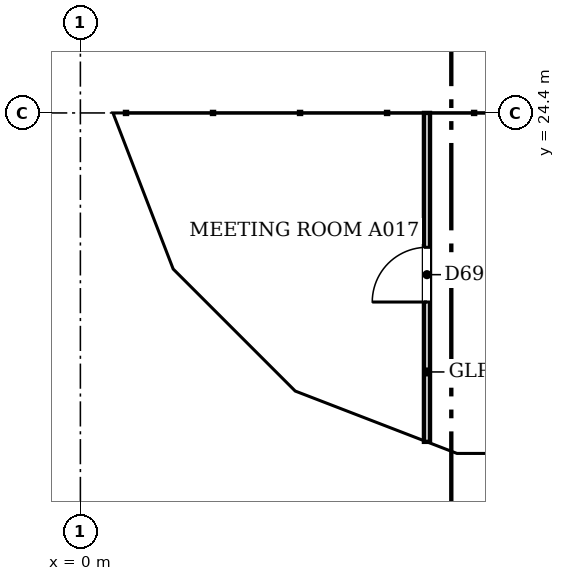
"""IFC4 building model, lengths in metres.
Left out: names, types, materials, properties, quantities, classifications, styles, units other than length and angle.
Written with IfcOpenShell. Run it as: python <this file> out.ifc"""

import sys

from ifc_helpers import new_model, si_unit, direction, frame, frame_2d, origin, place, context, subcontext, project, spatial, polyline, rectangle, outline, extrude, faceted_brep, source, transform, mapped, element, fill, save


model = new_model("IFC4")
c1 = context("Model", 3, precision=1e-05, world=origin(), true_north=direction((0.0, 1.0)))
c2 = subcontext(c1, "Body", "Model", "MODEL_VIEW")
j1 = project(units=[si_unit("LENGTHUNIT", "METRE"), si_unit("PLANEANGLEUNIT", "RADIAN")], contexts=[c1])
p1 = place(None, origin())
s1 = spatial("IfcSite", under=j1, at=p1, CompositionType="ELEMENT")
p2 = place(p1, origin())
s2 = spatial("IfcBuilding", under=s1, at=p2, CompositionType="ELEMENT")
p3 = place(p2, frame((0.0, 0.0, 139.2)))
s3 = spatial("IfcBuildingStorey", under=s2, at=p3, CompositionType="ELEMENT", Elevation=139.2)
m1 = source(origin(), c2, "Body", "Brep", [
    faceted_brep([(3.003, -0.25, 0.0), (3.05, -0.25, 0.06), (3.05, -0.25, 7.54), (3.003, -0.25, 7.6), (0.0, -0.25, 3.8), (0.0, 0.25, 3.8), (2.957, 0.25, 7.541), (2.957, 0.25, 0.059), (3.003, 0.0, 0.0), (3.003, 0.0, 7.6)], [[[0, 1, 2, 3, 4]], [[5, 6, 7]], [[1, 0, 8]], [[9, 3, 2]], [[6, 5, 4, 3, 9]], [[5, 7, 8, 0, 4]], [[1, 8, 7, 6, 9, 2]]]),
])
p4 = place(p3, frame((0.25, 27.45, -3.8), z_axis=(0.0, 0.0, 1.0), x_axis=(0.0, -1.0, 0.0)))
e1 = element("IfcWall", 1, at=p4, inside=s3, PredefinedType="SOLIDWALL", context=c2, shape_type="MappedRepresentation", body=[
    mapped(m1, transform((0.0, 0.0, 0.0), scale=1.0)),
])
m2 = source(origin(), c2, "Body", "SweptSolid", [
    extrude(outline(polyline([(2.803, 6.944), (0.319, 3.8), (2.803, 0.656), (2.803, 6.944)])), frame((0.0, 0.26, 0.0), z_axis=(0.0, -1.0, 0.0), x_axis=(1.0, 0.0, 0.0)), (0.0, 0.0, 1.0), 0.52),
])
p5 = place(p4, origin())
e2 = element("IfcOpeningElement", 2, at=p5, cuts=e1, PredefinedType="OPENING", context=c2, shape_type="MappedRepresentation", body=[
    mapped(m2, transform((0.0, 0.0, 0.0), scale=1.0)),
])
m3 = source(origin(), c2, "Body", "Brep", [
    faceted_brep([(0.047, -0.25, 0.0), (2.997, -0.25, 3.8), (0.047, -0.25, 7.6), (0.0, -0.25, 7.541), (0.0, -0.25, 0.059), (0.093, 0.25, 7.54), (2.944, 0.25, 3.868), (2.944, 0.25, 3.732), (0.093, 0.25, 0.06), (2.997, 0.0, 3.8), (0.047, 0.0, 0.0), (0.047, 0.0, 7.6)], [[[0, 1, 2, 3, 4]], [[5, 6, 7, 8]], [[8, 7, 9, 1, 0, 10]], [[6, 5, 11, 2, 1, 9]], [[3, 2, 11]], [[10, 0, 4]], [[8, 10, 4, 3, 11, 5]], [[9, 7, 6]]]),
])
p6 = place(p3, frame((0.233, 24.49, -3.8), z_axis=(0.0, 0.0, 1.0), x_axis=(0.359901446078, -0.932990326376, 0.0)))
e3 = element("IfcWall", 3, at=p6, inside=s3, PredefinedType="SOLIDWALL", context=c2, shape_type="MappedRepresentation", body=[
    mapped(m3, transform((0.0, 0.0, 0.0), scale=1.0)),
])
m4 = source(origin(), c2, "Body", "SweptSolid", [
    extrude(outline(polyline([(0.247, 0.665), (2.681, 3.8), (0.247, 6.935), (0.247, 0.665)])), frame((0.0, 0.26, 0.0), z_axis=(0.0, -1.0, 0.0), x_axis=(1.0, 0.0, 0.0)), (0.0, 0.0, 1.0), 0.52),
])
p7 = place(p6, origin())
e4 = element("IfcOpeningElement", 4, at=p7, cuts=e3, PredefinedType="OPENING", context=c2, shape_type="MappedRepresentation", body=[
    mapped(m4, transform((0.0, 0.0, 0.0), scale=1.0)),
])
m5 = source(origin(), c2, "Body", "Brep", [
    faceted_brep([(2.944, -0.25, 0.0), (2.997, -0.25, 0.068), (2.997, -0.25, 7.532), (2.944, -0.25, 7.6), (0.0, -0.25, 3.8), (0.053, 0.25, 3.868), (2.891, 0.25, 7.532), (2.891, 0.25, 0.068), (0.053, 0.25, 3.732), (2.944, 0.0, 0.0), (2.944, 0.0, 7.6), (0.0, 0.0, 3.8)], [[[0, 1, 2, 3, 4]], [[5, 6, 7, 8]], [[1, 0, 9]], [[10, 3, 2]], [[6, 5, 11, 4, 3, 10]], [[8, 7, 9, 0, 4, 11]], [[8, 11, 5]], [[1, 9, 7, 6, 10, 2]]]),
])
p8 = place(p3, frame((1.312, 21.694, -3.8), z_axis=(0.0, 0.0, 1.0), x_axis=(0.707066050402, -0.707147509625, 0.0)))
e5 = element("IfcWall", 5, at=p8, inside=s3, PredefinedType="SOLIDWALL", context=c2, shape_type="MappedRepresentation", body=[
    mapped(m5, transform((0.0, 0.0, 0.0), scale=1.0)),
])
m6 = source(origin(), c2, "Body", "SweptSolid", [
    extrude(outline(polyline([(2.744, 6.934), (0.316, 3.8), (2.744, 0.667), (2.744, 6.934)])), frame((0.0, 0.26, 0.0), z_axis=(0.0, -1.0, 0.0), x_axis=(1.0, 0.0, 0.0)), (0.0, 0.0, 1.0), 0.52),
])
p9 = place(p8, origin())
e6 = element("IfcOpeningElement", 6, at=p9, cuts=e5, PredefinedType="OPENING", context=c2, shape_type="MappedRepresentation", body=[
    mapped(m6, transform((0.0, 0.0, 0.0), scale=1.0)),
])
m7 = source(origin(), c2, "Body", "Brep", [
    faceted_brep([(0.053, -0.25, 0.0), (3.003, -0.25, 3.8), (0.053, -0.25, 7.6), (0.0, -0.25, 7.532), (0.0, -0.25, 0.068), (0.106, 0.25, 7.532), (2.957, 0.25, 3.86), (2.957, 0.25, 3.74), (0.106, 0.25, 0.068), (3.003, 0.0, 3.8), (0.053, 0.0, 0.0), (0.053, 0.0, 7.6)], [[[0, 1, 2, 3, 4]], [[5, 6, 7, 8]], [[8, 7, 9, 1, 0, 10]], [[6, 5, 11, 2, 1, 9]], [[3, 2, 11]], [[10, 0, 4]], [[8, 10, 4, 3, 11, 5]], [[9, 7, 6]]]),
])
p10 = place(p3, frame((3.344, 19.631, -3.8), z_axis=(0.0, 0.0, 1.0), x_axis=(0.933007896601, -0.359855894603, 0.0)))
e7 = element("IfcWall", 7, at=p10, inside=s3, PredefinedType="SOLIDWALL", context=c2, shape_type="MappedRepresentation", body=[
    mapped(m7, transform((0.0, 0.0, 0.0), scale=1.0)),
])
m8 = source(origin(), c2, "Body", "SweptSolid", [
    extrude(outline(polyline([(0.253, 0.665), (2.687, 3.8), (0.253, 6.935), (0.253, 0.665)])), frame((0.0, 0.26, 0.0), z_axis=(0.0, -1.0, 0.0), x_axis=(1.0, 0.0, 0.0)), (0.0, 0.0, 1.0), 0.52),
])
p11 = place(p10, origin())
e8 = element("IfcOpeningElement", 8, at=p11, cuts=e7, PredefinedType="OPENING", context=c2, shape_type="MappedRepresentation", body=[
    mapped(m8, transform((0.0, 0.0, 0.0), scale=1.0)),
])
m9 = source(origin(), c2, "Body", "Brep", [
    faceted_brep([(3.003, -0.25, 0.0), (6.053, -0.25, 3.8), (3.003, -0.25, 7.6), (0.0, -0.25, 3.8), (0.047, 0.25, 3.859), (3.003, 0.25, 7.6), (6.053, 0.25, 3.8), (3.003, 0.25, 0.0), (0.047, 0.25, 3.741), (0.0, 0.0, 3.8)], [[[0, 1, 2, 3]], [[4, 5, 6, 7, 8]], [[7, 6, 1, 0]], [[6, 5, 2, 1]], [[5, 4, 9, 3, 2]], [[8, 7, 0, 3, 9]], [[8, 9, 4]]]),
])
p12 = place(p3, frame((6.146, 18.55, -3.8), z_axis=(0.0, 0.0, 1.0), x_axis=(1.0, 0.0, 0.0)))
e9 = element("IfcWall", 9, at=p12, inside=s3, PredefinedType="SOLIDWALL", context=c2, shape_type="MappedRepresentation", body=[
    mapped(m9, transform((0.0, 0.0, 0.0), scale=1.0)),
])
m10 = source(origin(), c2, "Body", "SweptSolid", [
    extrude(outline(polyline([(3.005, 0.401), (5.733, 3.8), (3.005, 7.199), (0.319, 3.8), (3.005, 0.401)])), frame((0.0, 0.26, 0.0), z_axis=(0.0, -1.0, 0.0), x_axis=(1.0, 0.0, 0.0)), (0.0, 0.0, 1.0), 0.52),
])
p13 = place(p12, origin())
e10 = element("IfcOpeningElement", 10, at=p13, cuts=e9, PredefinedType="OPENING", context=c2, shape_type="MappedRepresentation", body=[
    mapped(m10, transform((0.0, 0.0, 0.0), scale=1.0)),
])
p14 = place(p2, frame((0.0, 0.0, 143.0)))
s4 = spatial("IfcBuildingStorey", under=s2, at=p14, CompositionType="ELEMENT", Elevation=143.0)
m11 = source(origin(), c2, "Body", "Brep", [
    faceted_brep([(3.05, -0.25, 0.0), (6.053, -0.25, 3.8), (3.05, -0.25, 7.6), (0.0, -0.25, 3.8), (0.0, 0.25, 3.8), (3.05, 0.25, 7.6), (6.007, 0.25, 3.859), (6.007, 0.25, 3.741), (3.05, 0.25, 0.0), (6.053, 0.0, 3.8)], [[[0, 1, 2, 3]], [[4, 5, 6, 7, 8]], [[8, 7, 9, 1, 0]], [[6, 5, 2, 1, 9]], [[5, 4, 3, 2]], [[4, 8, 0, 3]], [[9, 7, 6]]]),
])
p15 = place(p14, frame((0.25, 30.5, -3.8), z_axis=(0.0, 0.0, 1.0), x_axis=(0.0, -1.0, 0.0)))
e11 = element("IfcWall", 11, at=p15, inside=s4, PredefinedType="SOLIDWALL", context=c2, shape_type="MappedRepresentation", body=[
    mapped(m11, transform((0.0, 0.0, 0.0), scale=1.0)),
])
m12 = source(origin(), c2, "Body", "SweptSolid", [
    extrude(outline(polyline([(3.049, 0.401), (5.735, 3.8), (3.049, 7.199), (0.321, 3.8), (3.049, 0.401)])), frame((0.0, 0.26, 0.0), z_axis=(0.0, -1.0, 0.0), x_axis=(1.0, 0.0, 0.0)), (0.0, 0.0, 1.0), 0.52),
])
p16 = place(p15, origin())
e12 = element("IfcOpeningElement", 12, at=p16, cuts=e11, PredefinedType="OPENING", context=c2, shape_type="MappedRepresentation", body=[
    mapped(m12, transform((0.0, 0.0, 0.0), scale=1.0)),
])
m13 = source(origin(), c2, "Body", "Brep", [
    faceted_brep([(2.95, -0.25, 0.0), (3.003, -0.25, 0.068), (3.003, -0.25, 7.532), (2.95, -0.25, 7.6), (0.0, -0.25, 3.8), (0.047, 0.25, 3.86), (2.898, 0.25, 7.532), (2.898, 0.25, 0.068), (0.047, 0.25, 3.74), (2.95, 0.0, 0.0), (2.95, 0.0, 7.6), (0.0, 0.0, 3.8)], [[[0, 1, 2, 3, 4]], [[5, 6, 7, 8]], [[1, 0, 9]], [[10, 3, 2]], [[6, 5, 11, 4, 3, 10]], [[8, 7, 9, 0, 4, 11]], [[8, 11, 5]], [[1, 9, 7, 6, 10, 2]]]),
])
p17 = place(p14, frame((0.25, 24.447, -3.8), z_axis=(0.0, 0.0, 1.0), x_axis=(0.35992665181, -0.932980602862, 0.0)))
e13 = element("IfcWall", 13, at=p17, inside=s4, PredefinedType="SOLIDWALL", context=c2, shape_type="MappedRepresentation", body=[
    mapped(m13, transform((0.0, 0.0, 0.0), scale=1.0)),
])
m14 = source(origin(), c2, "Body", "SweptSolid", [
    extrude(outline(polyline([(2.75, 6.935), (0.316, 3.8), (2.75, 0.665), (2.75, 6.935)])), frame((0.0, 0.26, 0.0), z_axis=(0.0, -1.0, 0.0), x_axis=(1.0, 0.0, 0.0)), (0.0, 0.0, 1.0), 0.52),
])
p18 = place(p17, origin())
e14 = element("IfcOpeningElement", 14, at=p18, cuts=e13, PredefinedType="OPENING", context=c2, shape_type="MappedRepresentation", body=[
    mapped(m14, transform((0.0, 0.0, 0.0), scale=1.0)),
])
m15 = source(origin(), c2, "Body", "Brep", [
    faceted_brep([(0.053, -0.25, 0.0), (2.997, -0.25, 3.8), (0.053, -0.25, 7.6), (0.0, -0.25, 7.532), (0.0, -0.25, 0.068), (0.106, 0.25, 7.532), (2.944, 0.25, 3.868), (2.944, 0.25, 3.732), (0.106, 0.25, 0.068), (2.997, 0.0, 3.8), (0.053, 0.0, 0.0), (0.053, 0.0, 7.6)], [[[0, 1, 2, 3, 4]], [[5, 6, 7, 8]], [[8, 7, 9, 1, 0, 10]], [[6, 5, 11, 2, 1, 9]], [[3, 2, 11]], [[10, 0, 4]], [[8, 10, 4, 3, 11, 5]], [[9, 7, 6]]]),
])
p19 = place(p14, frame((1.274, 21.731, -3.8), z_axis=(0.0, 0.0, 1.0), x_axis=(0.707147509625, -0.707066050402, 0.0)))
e15 = element("IfcWall", 15, at=p19, inside=s4, PredefinedType="SOLIDWALL", context=c2, shape_type="MappedRepresentation", body=[
    mapped(m15, transform((0.0, 0.0, 0.0), scale=1.0)),
])
m16 = source(origin(), c2, "Body", "SweptSolid", [
    extrude(outline(polyline([(0.253, 0.666), (2.681, 3.8), (0.253, 6.934), (0.253, 0.666)])), frame((0.0, 0.26, 0.0), z_axis=(0.0, -1.0, 0.0), x_axis=(1.0, 0.0, 0.0)), (0.0, 0.0, 1.0), 0.52),
])
p20 = place(p19, origin())
e16 = element("IfcOpeningElement", 16, at=p20, cuts=e15, PredefinedType="OPENING", context=c2, shape_type="MappedRepresentation", body=[
    mapped(m16, transform((0.0, 0.0, 0.0), scale=1.0)),
])
m17 = source(origin(), c2, "Body", "Brep", [
    faceted_brep([(2.95, -0.25, 0.0), (2.997, -0.25, 0.059), (2.997, -0.25, 7.541), (2.95, -0.25, 7.6), (0.0, -0.25, 3.8), (0.053, 0.25, 3.868), (2.904, 0.25, 7.54), (2.904, 0.25, 0.06), (0.053, 0.25, 3.732), (2.95, 0.0, 0.0), (2.95, 0.0, 7.6), (0.0, 0.0, 3.8)], [[[0, 1, 2, 3, 4]], [[5, 6, 7, 8]], [[1, 0, 9]], [[10, 3, 2]], [[6, 5, 11, 4, 3, 10]], [[8, 7, 9, 0, 4, 11]], [[8, 11, 5]], [[1, 9, 7, 6, 10, 2]]]),
])
p21 = place(p14, frame((3.394, 19.612, -3.8), z_axis=(0.0, 0.0, 1.0), x_axis=(0.932990326376, -0.359901446078, 0.0)))
e17 = element("IfcWall", 17, at=p21, inside=s4, PredefinedType="SOLIDWALL", context=c2, shape_type="MappedRepresentation", body=[
    mapped(m17, transform((0.0, 0.0, 0.0), scale=1.0)),
])
p22 = place(p21, origin())
e18 = element("IfcOpeningElement", 18, at=p22, cuts=e17, PredefinedType="OPENING", context=c2, shape_type="MappedRepresentation", body=[
    mapped(m14, transform((0.0, 0.0, 0.0), scale=1.0)),
])
m18 = source(origin(), c2, "Body", "Brep", [
    faceted_brep([(0.047, -0.25, 0.0), (3.05, -0.25, 3.8), (0.047, -0.25, 7.6), (0.0, -0.25, 7.54), (0.0, -0.25, 0.06), (0.093, 0.25, 7.541), (3.05, 0.25, 3.8), (0.093, 0.25, 0.059), (0.047, 0.0, 0.0), (0.047, 0.0, 7.6)], [[[0, 1, 2, 3, 4]], [[5, 6, 7]], [[7, 6, 1, 0, 8]], [[6, 5, 9, 2, 1]], [[3, 2, 9]], [[8, 0, 4]], [[7, 8, 4, 3, 9, 5]]]),
])
p23 = place(p14, frame((6.1, 18.55, -3.8), z_axis=(0.0, 0.0, 1.0), x_axis=(1.0, 0.0, 0.0)))
e19 = element("IfcWall", 19, at=p23, inside=s4, PredefinedType="SOLIDWALL", context=c2, shape_type="MappedRepresentation", body=[
    mapped(m18, transform((0.0, 0.0, 0.0), scale=1.0)),
])
m19 = source(origin(), c2, "Body", "SweptSolid", [
    extrude(outline(polyline([(0.247, 0.656), (2.731, 3.8), (0.247, 6.944), (0.247, 0.656)])), frame((0.0, 0.26, 0.0), z_axis=(0.0, -1.0, 0.0), x_axis=(1.0, 0.0, 0.0)), (0.0, 0.0, 1.0), 0.52),
])
p24 = place(p23, origin())
e20 = element("IfcOpeningElement", 20, at=p24, cuts=e19, PredefinedType="OPENING", context=c2, shape_type="MappedRepresentation", body=[
    mapped(m19, transform((0.0, 0.0, 0.0), scale=1.0)),
])
p25 = place(p3, frame((5.7, 18.99, 0.0), z_axis=(0.0, 0.0, 1.0), x_axis=(0.0, 1.0, 0.0)))
e21 = element("IfcWall", 21, at=p25, inside=s3, PredefinedType="PARTITIONING", context=c2, shape_type="SweptSolid", body=[
    extrude(rectangle(XDim=5.41, YDim=0.1, at=frame_2d((2.705, 0.0))), origin(), (0.0, 0.0, 1.0), 3.067),
])
m20 = source(origin(), c2, "Body", "SweptSolid", [
    extrude(rectangle(XDim=0.9, YDim=2.1, at=frame_2d((0.45, 1.05))), frame((0.0, 0.06, 0.0), z_axis=(0.0, -1.0, 0.0), x_axis=(1.0, 0.0, 0.0)), (0.0, 0.0, 1.0), 0.12),
])
p26 = place(p25, frame((2.3, 0.0, 0.0)))
e22 = element("IfcOpeningElement", 22, at=p26, cuts=e21, PredefinedType="OPENING", context=c2, shape_type="MappedRepresentation", body=[
    mapped(m20, transform((0.0, 0.0, 0.0), scale=1.0)),
])
m21 = source(origin(), c2, "Body", "SweptSolid", [
    extrude(rectangle(XDim=0.9, YDim=2.1, at=frame_2d((0.45, 1.05))), frame((0.0, 0.025, 0.0), z_axis=(0.0, -1.0, 0.0), x_axis=(1.0, 0.0, 0.0)), (0.0, 0.0, 1.0), 0.05),
])
p27 = place(p26, origin())
e23 = element("IfcDoor", 23, at=p27, inside=s3, OperationType="SINGLE_SWING_LEFT", PredefinedType="DOOR", context=c2, shape_type="MappedRepresentation", body=[
    mapped(m21, transform((0.0, 0.0, 0.0), scale=1.0)),
])
fill(e22, e23)
save(model, sys.argv[1])
